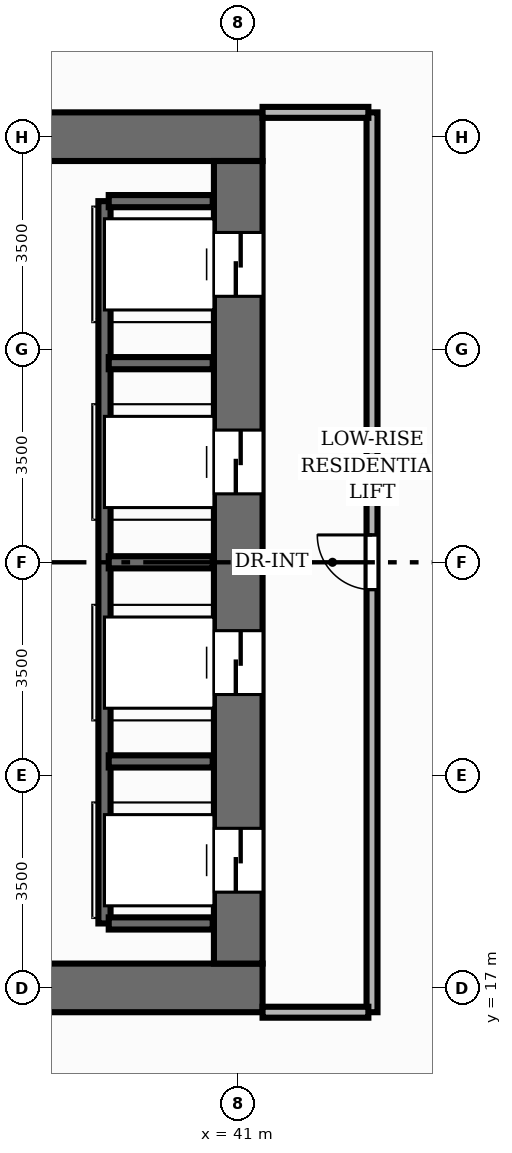
"""IFC4 building model, lengths in metres.
Left out: names, types, materials, properties, quantities, classifications, styles, units other than length and angle.
Written with IfcOpenShell. Run it as: python <this file> out.ifc"""

import sys

from ifc_helpers import new_model, si_unit, direction, frame, frame_2d, origin, place, context, subcontext, project, spatial, rectangle, extrude, element, fill, save


model = new_model("IFC4")
c1 = context("Model", 3, precision=1e-05, world=origin(), true_north=direction((0.0, 1.0)))
c2 = subcontext(c1, "Body", "Model", "MODEL_VIEW")
j1 = project(units=[si_unit("LENGTHUNIT", "METRE"), si_unit("PLANEANGLEUNIT", "RADIAN")], contexts=[c1])
p1 = place(None, origin())
s1 = spatial("IfcSite", under=j1, at=p1, CompositionType="ELEMENT")
p2 = place(p1, origin())
s2 = spatial("IfcBuilding", under=s1, at=p2, CompositionType="ELEMENT")
p3 = place(p2, origin())
s3 = spatial("IfcBuildingStorey", under=s2, at=p3, CompositionType="ELEMENT", Elevation=0.0)
p4 = place(p3, frame((22.6, 17.0, 0.0), z_axis=(0.0, 0.0, 1.0), x_axis=(1.0, 0.0, 0.0)))
e1 = element("IfcWall", 1, at=p4, inside=s3, PredefinedType="SHEAR", context=c2, shape_type="SweptSolid", body=[
    extrude(rectangle(XDim=18.8, YDim=0.8, at=frame_2d((9.4, 0.0))), origin(), (0.0, 0.0, 1.0), 4.0),
])
p5 = place(p4, frame((5.9, 0.0, 0.0)))
e2 = element("IfcOpeningElement", 2, at=p5, cuts=e1, PredefinedType="OPENING", context=c2, shape_type="SweptSolid", body=[
    extrude(rectangle(XDim=1.1, YDim=2.15, at=frame_2d((0.55, 1.075))), frame((0.0, 0.41, 0.0), z_axis=(0.0, -1.0, 0.0), x_axis=(1.0, 0.0, 0.0)), (0.0, 0.0, 1.0), 0.82),
])
p6 = place(p4, frame((11.3, 0.0, 0.0)))
e3 = element("IfcOpeningElement", 3, at=p6, cuts=e1, PredefinedType="OPENING", context=c2, shape_type="SweptSolid", body=[
    extrude(rectangle(XDim=1.1, YDim=2.15, at=frame_2d((0.55, 1.075))), frame((0.0, 0.41, 0.0), z_axis=(0.0, -1.0, 0.0), x_axis=(1.0, 0.0, 0.0)), (0.0, 0.0, 1.0), 0.82),
])
p7 = place(p4, frame((13.1, 0.0, 0.0)))
e4 = element("IfcOpeningElement", 4, at=p7, cuts=e1, PredefinedType="OPENING", context=c2, shape_type="SweptSolid", body=[
    extrude(rectangle(XDim=1.1, YDim=2.15, at=frame_2d((0.55, 1.075))), frame((0.0, 0.41, 0.0), z_axis=(0.0, -1.0, 0.0), x_axis=(1.0, 0.0, 0.0)), (0.0, 0.0, 1.0), 0.82),
])
p8 = place(p4, frame((9.45, 0.0, 0.0)))
e5 = element("IfcOpeningElement", 5, at=p8, cuts=e1, PredefinedType="OPENING", context=c2, shape_type="SweptSolid", body=[
    extrude(rectangle(XDim=0.9, YDim=2.1, at=frame_2d((0.45, 1.05))), frame((0.0, 0.41, 0.0), z_axis=(0.0, -1.0, 0.0), x_axis=(1.0, 0.0, 0.0)), (0.0, 0.0, 1.0), 0.82),
])
p9 = place(p3, frame((22.6, 31.0, 0.0), z_axis=(0.0, 0.0, 1.0), x_axis=(1.0, 0.0, 0.0)))
e6 = element("IfcWall", 6, at=p9, inside=s3, PredefinedType="SHEAR", context=c2, shape_type="SweptSolid", body=[
    extrude(rectangle(XDim=18.8, YDim=0.8, at=frame_2d((9.4, 0.0))), origin(), (0.0, 0.0, 1.0), 4.0),
])
p10 = place(p9, frame((11.8, 0.0, 0.0)))
e7 = element("IfcOpeningElement", 7, at=p10, cuts=e6, PredefinedType="OPENING", context=c2, shape_type="SweptSolid", body=[
    extrude(rectangle(XDim=1.1, YDim=2.15, at=frame_2d((0.55, 1.075))), frame((0.0, 0.41, 0.0), z_axis=(0.0, -1.0, 0.0), x_axis=(1.0, 0.0, 0.0)), (0.0, 0.0, 1.0), 0.82),
])
p11 = place(p9, frame((4.425, 0.0, 0.0)))
e8 = element("IfcOpeningElement", 8, at=p11, cuts=e6, PredefinedType="OPENING", context=c2, shape_type="SweptSolid", body=[
    extrude(rectangle(XDim=1.05, YDim=2.15, at=frame_2d((0.525, 1.075))), frame((0.0, 0.41, 0.0), z_axis=(0.0, -1.0, 0.0), x_axis=(1.0, 0.0, 0.0)), (0.0, 0.0, 1.0), 0.82),
])
p12 = place(p9, frame((6.175, 0.0, 0.0)))
e9 = element("IfcOpeningElement", 9, at=p12, cuts=e6, PredefinedType="OPENING", context=c2, shape_type="SweptSolid", body=[
    extrude(rectangle(XDim=1.05, YDim=2.15, at=frame_2d((0.525, 1.075))), frame((0.0, 0.41, 0.0), z_axis=(0.0, -1.0, 0.0), x_axis=(1.0, 0.0, 0.0)), (0.0, 0.0, 1.0), 0.82),
])
p13 = place(p9, frame((7.925, 0.0, 0.0)))
e10 = element("IfcOpeningElement", 10, at=p13, cuts=e6, PredefinedType="OPENING", context=c2, shape_type="SweptSolid", body=[
    extrude(rectangle(XDim=1.05, YDim=2.15, at=frame_2d((0.525, 1.075))), frame((0.0, 0.41, 0.0), z_axis=(0.0, -1.0, 0.0), x_axis=(1.0, 0.0, 0.0)), (0.0, 0.0, 1.0), 0.82),
])
p14 = place(p3, frame((41.0, 17.4, 0.0), z_axis=(0.0, 0.0, 1.0), x_axis=(0.0, 1.0, 0.0)))
e11 = element("IfcWall", 11, at=p14, inside=s3, PredefinedType="SHEAR", context=c2, shape_type="SweptSolid", body=[
    extrude(rectangle(XDim=13.2, YDim=0.8, at=frame_2d((6.6, 0.0))), origin(), (0.0, 0.0, 1.0), 4.0),
])
p15 = place(p14, frame((1.175, 0.0, 0.0)))
e12 = element("IfcOpeningElement", 12, at=p15, cuts=e11, PredefinedType="OPENING", context=c2, shape_type="SweptSolid", body=[
    extrude(rectangle(XDim=1.05, YDim=2.15, at=frame_2d((0.525, 1.075))), frame((0.0, 0.41, 0.0), z_axis=(0.0, -1.0, 0.0), x_axis=(1.0, 0.0, 0.0)), (0.0, 0.0, 1.0), 0.82),
])
p16 = place(p14, frame((4.425, 0.0, 0.0)))
e13 = element("IfcOpeningElement", 13, at=p16, cuts=e11, PredefinedType="OPENING", context=c2, shape_type="SweptSolid", body=[
    extrude(rectangle(XDim=1.05, YDim=2.15, at=frame_2d((0.525, 1.075))), frame((0.0, 0.41, 0.0), z_axis=(0.0, -1.0, 0.0), x_axis=(1.0, 0.0, 0.0)), (0.0, 0.0, 1.0), 0.82),
])
p17 = place(p14, frame((7.725, 0.0, 0.0)))
e14 = element("IfcOpeningElement", 14, at=p17, cuts=e11, PredefinedType="OPENING", context=c2, shape_type="SweptSolid", body=[
    extrude(rectangle(XDim=1.05, YDim=2.15, at=frame_2d((0.525, 1.075))), frame((0.0, 0.41, 0.0), z_axis=(0.0, -1.0, 0.0), x_axis=(1.0, 0.0, 0.0)), (0.0, 0.0, 1.0), 0.82),
])
p18 = place(p14, frame((10.975, 0.0, 0.0)))
e15 = element("IfcOpeningElement", 15, at=p18, cuts=e11, PredefinedType="OPENING", context=c2, shape_type="SweptSolid", body=[
    extrude(rectangle(XDim=1.05, YDim=2.15, at=frame_2d((0.525, 1.075))), frame((0.0, 0.41, 0.0), z_axis=(0.0, -1.0, 0.0), x_axis=(1.0, 0.0, 0.0)), (0.0, 0.0, 1.0), 0.82),
])
p19 = place(p3, frame((38.8, 18.06, 0.0), z_axis=(0.0, 0.0, 1.0), x_axis=(0.0, 1.0, 0.0)))
e16 = element("IfcWall", 16, at=p19, inside=s3, PredefinedType="SHEAR", context=c2, shape_type="SweptSolid", body=[
    extrude(rectangle(XDim=11.88, YDim=0.2, at=frame_2d((5.94, 0.0))), origin(), (0.0, 0.0, 1.0), 4.0),
])
for number, where, z_axis, x_axis in (
    (17, (38.87, 18.06, 0.0), (0.0, 0.0, 1.0), (1.0, 0.0, 0.0)),
    (18, (38.87, 29.94, 0.0), (0.0, 0.0, 1.0), (1.0, 0.0, 0.0)),
    (19, (38.87, 20.725, 0.0), (0.0, 0.0, 1.0), (1.0, 0.0, 0.0)),
    (20, (38.87, 24.0, 0.0), (0.0, 0.0, 1.0), (1.0, 0.0, 0.0)),
    (21, (38.87, 27.275, 0.0), (0.0, 0.0, 1.0), (1.0, 0.0, 0.0)),
):
    element("IfcWall", number, at=place(p3, frame(where, z_axis=z_axis, x_axis=x_axis)), inside=s3, PredefinedType="SHEAR", context=c2, shape_type="SweptSolid", body=[
        extrude(rectangle(XDim=1.71, YDim=0.2, at=frame_2d((0.855, 0.0))), origin(), (0.0, 0.0, 1.0), 4.0),
    ])
p20 = place(p3, frame((43.2, 16.6, 0.0), z_axis=(0.0, 0.0, 1.0), x_axis=(0.0, 1.0, 0.0)))
e22 = element("IfcWall", 22, at=p20, inside=s3, PredefinedType="PARTITIONING", context=c2, shape_type="SweptSolid", body=[
    extrude(rectangle(XDim=14.8, YDim=0.18, at=frame_2d((7.4, 0.0))), origin(), (0.0, 0.0, 1.0), 3.715),
])
p21 = place(p20, frame((6.95, 0.0, 0.0)))
e23 = element("IfcOpeningElement", 23, at=p21, cuts=e22, PredefinedType="OPENING", context=c2, shape_type="SweptSolid", body=[
    extrude(rectangle(XDim=0.9, YDim=2.1, at=frame_2d((0.45, 1.05))), frame((0.0, 0.1, 0.0), z_axis=(0.0, -1.0, 0.0), x_axis=(1.0, 0.0, 0.0)), (0.0, 0.0, 1.0), 0.2),
])
for number, where, z_axis, x_axis in (
    (24, (43.14, 31.4, 0.0), (0.0, 0.0, 1.0), (-1.0, 0.0, 0.0)),
    (25, (41.4, 16.6, 0.0), (0.0, 0.0, 1.0), (1.0, 0.0, 0.0)),
):
    element("IfcWall", number, at=place(p3, frame(where, z_axis=z_axis, x_axis=x_axis)), inside=s3, PredefinedType="PARTITIONING", context=c2, shape_type="SweptSolid", body=[
        extrude(rectangle(XDim=1.74, YDim=0.18, at=frame_2d((0.87, 0.0))), origin(), (0.0, 0.0, 1.0), 3.715),
    ])
p22 = place(p15, origin())
e26 = element("IfcDoor", 26, at=p22, inside=s3, OperationType="DOUBLE_DOOR_SLIDING", PredefinedType="DOOR", context=c2, shape_type="SweptSolid", body=[
    extrude(rectangle(XDim=1.05, YDim=2.15, at=frame_2d((0.525, 1.075))), frame((0.0, 0.025, 0.0), z_axis=(0.0, -1.0, 0.0), x_axis=(1.0, 0.0, 0.0)), (0.0, 0.0, 1.0), 0.05),
])
fill(e12, e26)
p23 = place(p16, origin())
e27 = element("IfcDoor", 27, at=p23, inside=s3, OperationType="DOUBLE_DOOR_SLIDING", PredefinedType="DOOR", context=c2, shape_type="SweptSolid", body=[
    extrude(rectangle(XDim=1.05, YDim=2.15, at=frame_2d((0.525, 1.075))), frame((0.0, 0.025, 0.0), z_axis=(0.0, -1.0, 0.0), x_axis=(1.0, 0.0, 0.0)), (0.0, 0.0, 1.0), 0.05),
])
fill(e13, e27)
p24 = place(p17, origin())
e28 = element("IfcDoor", 28, at=p24, inside=s3, OperationType="DOUBLE_DOOR_SLIDING", PredefinedType="DOOR", context=c2, shape_type="SweptSolid", body=[
    extrude(rectangle(XDim=1.05, YDim=2.15, at=frame_2d((0.525, 1.075))), frame((0.0, 0.025, 0.0), z_axis=(0.0, -1.0, 0.0), x_axis=(1.0, 0.0, 0.0)), (0.0, 0.0, 1.0), 0.05),
])
fill(e14, e28)
p25 = place(p18, origin())
e29 = element("IfcDoor", 29, at=p25, inside=s3, OperationType="DOUBLE_DOOR_SLIDING", PredefinedType="DOOR", context=c2, shape_type="SweptSolid", body=[
    extrude(rectangle(XDim=1.05, YDim=2.15, at=frame_2d((0.525, 1.075))), frame((0.0, 0.025, 0.0), z_axis=(0.0, -1.0, 0.0), x_axis=(1.0, 0.0, 0.0)), (0.0, 0.0, 1.0), 0.05),
])
fill(e15, e29)
p26 = place(p21, origin())
e30 = element("IfcDoor", 30, at=p26, inside=s3, OperationType="SINGLE_SWING_RIGHT", PredefinedType="DOOR", context=c2, shape_type="SweptSolid", body=[
    extrude(rectangle(XDim=0.9, YDim=2.1, at=frame_2d((0.45, 1.05))), frame((0.0, 0.025, 0.0), z_axis=(0.0, -1.0, 0.0), x_axis=(1.0, 0.0, 0.0)), (0.0, 0.0, 1.0), 0.05),
])
fill(e23, e30)
save(model, sys.argv[1])
